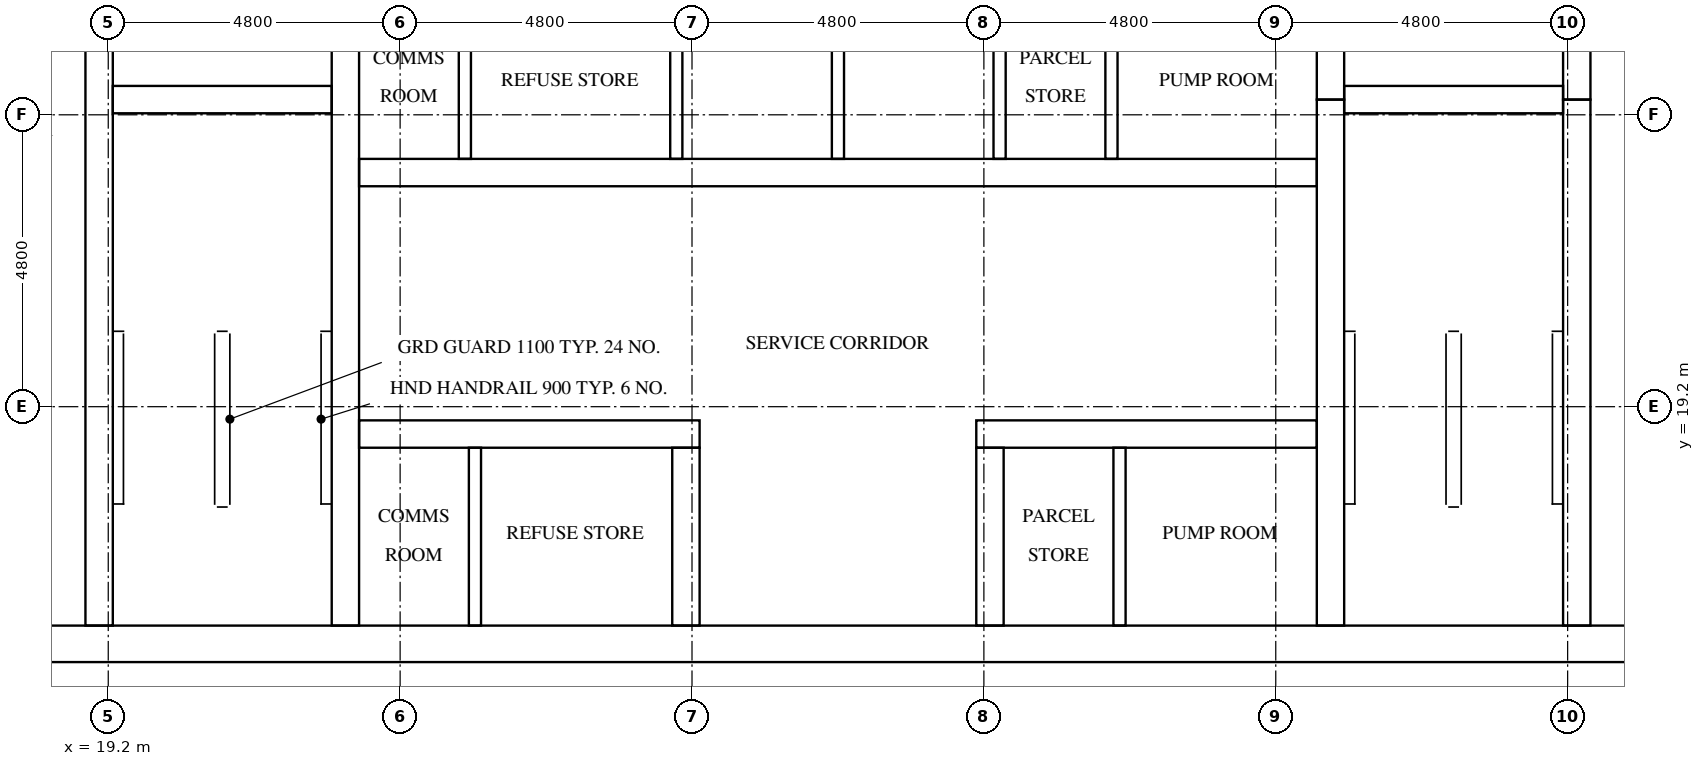
"""IFC4 building model, lengths in metres.
Left out: names, types, materials, properties, quantities, classifications, styles, units other than length and angle.
Written with IfcOpenShell. Run it as: python <this file> out.ifc"""

import sys

from ifc_helpers import new_model, si_unit, direction, frame, frame_2d, origin, place, context, subcontext, project, spatial, rectangle, extrude, element, fill, save


model = new_model("IFC4")
c1 = context("Model", 3, precision=1e-05, world=origin(), true_north=direction((0.0, 1.0)))
c2 = subcontext(c1, "Body", "Model", "MODEL_VIEW")
j1 = project(units=[si_unit("LENGTHUNIT", "METRE"), si_unit("PLANEANGLEUNIT", "RADIAN")], contexts=[c1])
p1 = place(None, origin())
s1 = spatial("IfcSite", under=j1, at=p1, CompositionType="ELEMENT")
p2 = place(p1, origin())
s2 = spatial("IfcBuilding", under=s1, at=p2, CompositionType="ELEMENT")
p3 = place(p2, frame((0.0, 0.0, 256.2)))
s3 = spatial("IfcBuildingStorey", under=s2, at=p3, CompositionType="ELEMENT", Elevation=256.2)
p4 = place(p3, frame((15.0, 15.3, 0.0), z_axis=(0.0, 0.0, 1.0), x_axis=(1.0, 0.0, 0.0)))
e1 = element("IfcWall", 1, at=p4, inside=s3, PredefinedType="SHEAR", context=c2, shape_type="SweptSolid", body=[
    extrude(rectangle(XDim=32.4, YDim=0.6, at=frame_2d((16.2, 0.0))), origin(), (0.0, 0.0, 1.0), 3.2),
])
p5 = place(p4, frame((15.3, 0.0, 0.0)))
e2 = element("IfcOpeningElement", 2, at=p5, cuts=e1, PredefinedType="OPENING", context=c2, shape_type="SweptSolid", body=[
    extrude(rectangle(XDim=1.8, YDim=2.1, at=frame_2d((0.9, 1.05))), frame((0.0, 0.31, 0.0), z_axis=(0.0, -1.0, 0.0), x_axis=(1.0, 0.0, 0.0)), (0.0, 0.0, 1.0), 0.62),
])
p6 = place(p3, frame((19.05, 15.6, 0.0), z_axis=(0.0, 0.0, 1.0), x_axis=(0.0, 1.0, 0.0)))
e3 = element("IfcWall", 3, at=p6, inside=s3, PredefinedType="SHEAR", context=c2, shape_type="SweptSolid", body=[
    extrude(rectangle(XDim=15.425, YDim=0.45, at=frame_2d((7.712, 0.0))), origin(), (0.0, 0.0, 1.0), 3.2),
])
p7 = place(p6, frame((9.85, 0.0, 0.0)))
e4 = element("IfcOpeningElement", 4, at=p7, cuts=e3, PredefinedType="OPENING", context=c2, shape_type="SweptSolid", body=[
    extrude(rectangle(XDim=1.1, YDim=2.1, at=frame_2d((0.55, 1.05))), frame((0.0, 0.235, 0.0), z_axis=(0.0, -1.0, 0.0), x_axis=(1.0, 0.0, 0.0)), (0.0, 0.0, 1.0), 0.47),
])
p8 = place(p6, frame((13.35, 0.0, 0.0)))
e5 = element("IfcOpeningElement", 5, at=p8, cuts=e3, PredefinedType="OPENING", context=c2, shape_type="SweptSolid", body=[
    extrude(rectangle(XDim=1.1, YDim=2.1, at=frame_2d((0.55, 1.05))), frame((0.0, 0.235, 0.0), z_axis=(0.0, -1.0, 0.0), x_axis=(1.0, 0.0, 0.0)), (0.0, 0.0, 1.0), 0.47),
])
p9 = place(p6, frame((0.6, 0.0, 0.0)))
e6 = element("IfcOpeningElement", 6, at=p9, cuts=e3, PredefinedType="OPENING", context=c2, shape_type="SweptSolid", body=[
    extrude(rectangle(XDim=1.2, YDim=2.1, at=frame_2d((0.6, 1.05))), frame((0.0, 0.235, 0.0), z_axis=(0.0, -1.0, 0.0), x_axis=(1.0, 0.0, 0.0)), (0.0, 0.0, 1.0), 0.47),
])
p10 = place(p3, frame((23.1, 15.6, 0.0), z_axis=(0.0, 0.0, 1.0), x_axis=(0.0, 1.0, 0.0)))
e7 = element("IfcWall", 7, at=p10, inside=s3, PredefinedType="SHEAR", context=c2, shape_type="SweptSolid", body=[
    extrude(rectangle(XDim=21.6, YDim=0.45, at=frame_2d((10.8, 0.0))), origin(), (0.0, 0.0, 1.0), 3.2),
])
p11 = place(p3, frame((39.3, 15.6, 0.0), z_axis=(0.0, 0.0, 1.0), x_axis=(0.0, 1.0, 0.0)))
e8 = element("IfcWall", 8, at=p11, inside=s3, PredefinedType="SHEAR", context=c2, shape_type="SweptSolid", body=[
    extrude(rectangle(XDim=8.65, YDim=0.45, at=frame_2d((4.325, 0.0))), origin(), (0.0, 0.0, 1.0), 3.2),
])
p12 = place(p3, frame((39.3, 24.25, 0.0), z_axis=(0.0, 0.0, 1.0), x_axis=(0.0, 1.0, 0.0)))
e9 = element("IfcWall", 9, at=p12, inside=s3, PredefinedType="SHEAR", context=c2, shape_type="SweptSolid", body=[
    extrude(rectangle(XDim=3.5, YDim=0.45, at=frame_2d((1.75, 0.0))), origin(), (0.0, 0.0, 1.0), 3.2),
])
p13 = place(p3, frame((43.35, 15.6, 0.0), z_axis=(0.0, 0.0, 1.0), x_axis=(0.0, 1.0, 0.0)))
e10 = element("IfcWall", 10, at=p13, inside=s3, PredefinedType="SHEAR", context=c2, shape_type="SweptSolid", body=[
    extrude(rectangle(XDim=8.65, YDim=0.45, at=frame_2d((4.325, 0.0))), origin(), (0.0, 0.0, 1.0), 3.2),
])
p14 = place(p13, frame((0.6, 0.0, 0.0)))
e11 = element("IfcOpeningElement", 11, at=p14, cuts=e10, PredefinedType="OPENING", context=c2, shape_type="SweptSolid", body=[
    extrude(rectangle(XDim=1.2, YDim=2.1, at=frame_2d((0.6, 1.05))), frame((0.0, 0.235, 0.0), z_axis=(0.0, -1.0, 0.0), x_axis=(1.0, 0.0, 0.0)), (0.0, 0.0, 1.0), 0.47),
])
p15 = place(p3, frame((43.35, 24.25, 0.0), z_axis=(0.0, 0.0, 1.0), x_axis=(0.0, 1.0, 0.0)))
e12 = element("IfcWall", 12, at=p15, inside=s3, PredefinedType="SHEAR", context=c2, shape_type="SweptSolid", body=[
    extrude(rectangle(XDim=3.5, YDim=0.45, at=frame_2d((1.75, 0.0))), origin(), (0.0, 0.0, 1.0), 3.2),
])
p16 = place(p15, frame((1.2, 0.0, 0.0)))
e13 = element("IfcOpeningElement", 13, at=p16, cuts=e12, PredefinedType="OPENING", context=c2, shape_type="SweptSolid", body=[
    extrude(rectangle(XDim=1.1, YDim=2.1, at=frame_2d((0.55, 1.05))), frame((0.0, 0.235, 0.0), z_axis=(0.0, -1.0, 0.0), x_axis=(1.0, 0.0, 0.0)), (0.0, 0.0, 1.0), 0.47),
])
for number, where, z_axis, x_axis in (
    (14, (19.275, 24.25, 0.0), (0.0, 0.0, 1.0), (1.0, 0.0, 0.0)),
    (15, (39.525, 24.25, 0.0), (0.0, 0.0, 1.0), (1.0, 0.0, 0.0)),
):
    element("IfcWall", number, at=place(p3, frame(where, z_axis=z_axis, x_axis=x_axis)), inside=s3, PredefinedType="SHEAR", context=c2, shape_type="SweptSolid", body=[
        extrude(rectangle(XDim=3.6, YDim=0.45, at=frame_2d((1.8, 0.0))), origin(), (0.0, 0.0, 1.0), 3.2),
    ])
p17 = place(p3, frame((23.325, 18.75, 0.0), z_axis=(0.0, 0.0, 1.0), x_axis=(1.0, 0.0, 0.0)))
e16 = element("IfcWall", 16, at=p17, inside=s3, PredefinedType="SHEAR", context=c2, shape_type="SweptSolid", body=[
    extrude(rectangle(XDim=5.6, YDim=0.45, at=frame_2d((2.8, 0.0))), origin(), (0.0, 0.0, 1.0), 3.2),
])
p18 = place(p17, frame((0.403, 0.0, 0.0)))
e17 = element("IfcOpeningElement", 17, at=p18, cuts=e16, PredefinedType="OPENING", context=c2, shape_type="SweptSolid", body=[
    extrude(rectangle(XDim=1.0, YDim=2.1, at=frame_2d((0.5, 1.05))), frame((0.0, 0.235, 0.0), z_axis=(0.0, -1.0, 0.0), x_axis=(1.0, 0.0, 0.0)), (0.0, 0.0, 1.0), 0.47),
])
p19 = place(p17, frame((3.078, 0.0, 0.0)))
e18 = element("IfcOpeningElement", 18, at=p19, cuts=e16, PredefinedType="OPENING", context=c2, shape_type="SweptSolid", body=[
    extrude(rectangle(XDim=1.0, YDim=2.1, at=frame_2d((0.5, 1.05))), frame((0.0, 0.235, 0.0), z_axis=(0.0, -1.0, 0.0), x_axis=(1.0, 0.0, 0.0)), (0.0, 0.0, 1.0), 0.47),
])
p20 = place(p3, frame((33.475, 18.75, 0.0), z_axis=(0.0, 0.0, 1.0), x_axis=(1.0, 0.0, 0.0)))
e19 = element("IfcWall", 19, at=p20, inside=s3, PredefinedType="SHEAR", context=c2, shape_type="SweptSolid", body=[
    extrude(rectangle(XDim=5.6, YDim=0.45, at=frame_2d((2.8, 0.0))), origin(), (0.0, 0.0, 1.0), 3.2),
])
p21 = place(p20, frame((0.853, 0.0, 0.0)))
e20 = element("IfcOpeningElement", 20, at=p21, cuts=e19, PredefinedType="OPENING", context=c2, shape_type="SweptSolid", body=[
    extrude(rectangle(XDim=1.0, YDim=2.1, at=frame_2d((0.5, 1.05))), frame((0.0, 0.235, 0.0), z_axis=(0.0, -1.0, 0.0), x_axis=(1.0, 0.0, 0.0)), (0.0, 0.0, 1.0), 0.47),
])
p22 = place(p20, frame((3.528, 0.0, 0.0)))
e21 = element("IfcOpeningElement", 21, at=p22, cuts=e19, PredefinedType="OPENING", context=c2, shape_type="SweptSolid", body=[
    extrude(rectangle(XDim=1.0, YDim=2.1, at=frame_2d((0.5, 1.05))), frame((0.0, 0.235, 0.0), z_axis=(0.0, -1.0, 0.0), x_axis=(1.0, 0.0, 0.0)), (0.0, 0.0, 1.0), 0.47),
])
p23 = place(p3, frame((23.325, 23.05, 0.0), z_axis=(0.0, 0.0, 1.0), x_axis=(1.0, 0.0, 0.0)))
e22 = element("IfcWall", 22, at=p23, inside=s3, PredefinedType="SHEAR", context=c2, shape_type="SweptSolid", body=[
    extrude(rectangle(XDim=15.75, YDim=0.45, at=frame_2d((7.875, 0.0))), origin(), (0.0, 0.0, 1.0), 3.2),
])
p24 = place(p23, frame((0.32, 0.0, 0.0)))
e23 = element("IfcOpeningElement", 23, at=p24, cuts=e22, PredefinedType="OPENING", context=c2, shape_type="SweptSolid", body=[
    extrude(rectangle(XDim=1.0, YDim=2.1, at=frame_2d((0.5, 1.05))), frame((0.0, 0.235, 0.0), z_axis=(0.0, -1.0, 0.0), x_axis=(1.0, 0.0, 0.0)), (0.0, 0.0, 1.0), 0.47),
])
p25 = place(p23, frame((2.978, 0.0, 0.0)))
e24 = element("IfcOpeningElement", 24, at=p25, cuts=e22, PredefinedType="OPENING", context=c2, shape_type="SweptSolid", body=[
    extrude(rectangle(XDim=1.0, YDim=2.1, at=frame_2d((0.5, 1.05))), frame((0.0, 0.235, 0.0), z_axis=(0.0, -1.0, 0.0), x_axis=(1.0, 0.0, 0.0)), (0.0, 0.0, 1.0), 0.47),
])
p26 = place(p23, frame((10.953, 0.0, 0.0)))
e25 = element("IfcOpeningElement", 25, at=p26, cuts=e22, PredefinedType="OPENING", context=c2, shape_type="SweptSolid", body=[
    extrude(rectangle(XDim=1.0, YDim=2.1, at=frame_2d((0.5, 1.05))), frame((0.0, 0.235, 0.0), z_axis=(0.0, -1.0, 0.0), x_axis=(1.0, 0.0, 0.0)), (0.0, 0.0, 1.0), 0.47),
])
p27 = place(p23, frame((13.612, 0.0, 0.0)))
e26 = element("IfcOpeningElement", 26, at=p27, cuts=e22, PredefinedType="OPENING", context=c2, shape_type="SweptSolid", body=[
    extrude(rectangle(XDim=1.0, YDim=2.1, at=frame_2d((0.5, 1.05))), frame((0.0, 0.235, 0.0), z_axis=(0.0, -1.0, 0.0), x_axis=(1.0, 0.0, 0.0)), (0.0, 0.0, 1.0), 0.47),
])
for number, where, z_axis, x_axis in (
    (27, (28.7, 15.6, 0.0), (0.0, 0.0, 1.0), (0.0, 1.0, 0.0)),
    (28, (33.7, 15.6, 0.0), (0.0, 0.0, 1.0), (0.0, 1.0, 0.0)),
):
    element("IfcWall", number, at=place(p3, frame(where, z_axis=z_axis, x_axis=x_axis)), inside=s3, PredefinedType="SHEAR", context=c2, shape_type="SweptSolid", body=[
        extrude(rectangle(XDim=2.925, YDim=0.45, at=frame_2d((1.462, 0.0))), origin(), (0.0, 0.0, 1.0), 3.2),
    ])
for number, where, z_axis, x_axis in (
    (29, (28.542, 23.275, 0.0), (0.0, 0.0, 1.0), (0.0, 1.0, 0.0)),
    (30, (31.2, 23.275, 0.0), (0.0, 0.0, 1.0), (0.0, 1.0, 0.0)),
    (31, (33.858, 23.275, 0.0), (0.0, 0.0, 1.0), (0.0, 1.0, 0.0)),
):
    element("IfcWall", number, at=place(p3, frame(where, z_axis=z_axis, x_axis=x_axis)), inside=s3, PredefinedType="SOLIDWALL", context=c2, shape_type="SweptSolid", body=[
        extrude(rectangle(XDim=2.65, YDim=0.2, at=frame_2d((1.325, 0.0))), origin(), (0.0, 0.0, 1.0), 3.2),
    ])
for number, where, z_axis, x_axis in (
    (32, (25.065, 23.275, 0.0), (0.0, 0.0, 1.0), (0.0, 1.0, 0.0)),
    (33, (35.698, 23.275, 0.0), (0.0, 0.0, 1.0), (0.0, 1.0, 0.0)),
):
    element("IfcWall", number, at=place(p3, frame(where, z_axis=z_axis, x_axis=x_axis)), inside=s3, PredefinedType="PARTITIONING", context=c2, shape_type="SweptSolid", body=[
        extrude(rectangle(XDim=2.65, YDim=0.2, at=frame_2d((1.325, 0.0))), origin(), (0.0, 0.0, 1.0), 3.2),
    ])
for number, where, z_axis, x_axis in (
    (34, (25.23, 15.6, 0.0), (0.0, 0.0, 1.0), (0.0, 1.0, 0.0)),
    (35, (35.831, 15.6, 0.0), (0.0, 0.0, 1.0), (0.0, 1.0, 0.0)),
):
    element("IfcWall", number, at=place(p3, frame(where, z_axis=z_axis, x_axis=x_axis)), inside=s3, PredefinedType="PARTITIONING", context=c2, shape_type="SweptSolid", body=[
        extrude(rectangle(XDim=2.925, YDim=0.2, at=frame_2d((1.462, 0.0))), origin(), (0.0, 0.0, 1.0), 3.2),
    ])
p28 = place(p9, frame((1.2, 0.0, 0.0), z_axis=(0.0, 0.0, 1.0), x_axis=(-1.0, 0.0, 0.0)))
e36 = element("IfcDoor", 36, at=p28, inside=s3, OperationType="SINGLE_SWING_LEFT", PredefinedType="DOOR", context=c2, shape_type="SweptSolid", body=[
    extrude(rectangle(XDim=1.2, YDim=2.1, at=frame_2d((0.6, 1.05))), frame((0.0, 0.025, 0.0), z_axis=(0.0, -1.0, 0.0), x_axis=(1.0, 0.0, 0.0)), (0.0, 0.0, 1.0), 0.05),
])
fill(e6, e36)
p29 = place(p14, origin())
e37 = element("IfcDoor", 37, at=p29, inside=s3, OperationType="SINGLE_SWING_RIGHT", PredefinedType="DOOR", context=c2, shape_type="SweptSolid", body=[
    extrude(rectangle(XDim=1.2, YDim=2.1, at=frame_2d((0.6, 1.05))), frame((0.0, 0.025, 0.0), z_axis=(0.0, -1.0, 0.0), x_axis=(1.0, 0.0, 0.0)), (0.0, 0.0, 1.0), 0.05),
])
fill(e11, e37)
p30 = place(p5, frame((1.8, 0.0, 0.0), z_axis=(0.0, 0.0, 1.0), x_axis=(-1.0, 0.0, 0.0)))
e38 = element("IfcDoor", 38, at=p30, inside=s3, OperationType="DOUBLE_DOOR_SINGLE_SWING", PredefinedType="DOOR", context=c2, shape_type="SweptSolid", body=[
    extrude(rectangle(XDim=1.8, YDim=2.1, at=frame_2d((0.9, 1.05))), frame((0.0, 0.025, 0.0), z_axis=(0.0, -1.0, 0.0), x_axis=(1.0, 0.0, 0.0)), (0.0, 0.0, 1.0), 0.05),
])
fill(e2, e38)
p31 = place(p24, frame((1.0, 0.0, 0.0), z_axis=(0.0, 0.0, 1.0), x_axis=(-1.0, 0.0, 0.0)))
e39 = element("IfcDoor", 39, at=p31, inside=s3, OperationType="SINGLE_SWING_RIGHT", PredefinedType="DOOR", context=c2, shape_type="SweptSolid", body=[
    extrude(rectangle(XDim=1.0, YDim=2.1, at=frame_2d((0.5, 1.05))), frame((0.0, 0.025, 0.0), z_axis=(0.0, -1.0, 0.0), x_axis=(1.0, 0.0, 0.0)), (0.0, 0.0, 1.0), 0.05),
])
fill(e23, e39)
p32 = place(p25, frame((1.0, 0.0, 0.0), z_axis=(0.0, 0.0, 1.0), x_axis=(-1.0, 0.0, 0.0)))
e40 = element("IfcDoor", 40, at=p32, inside=s3, OperationType="SINGLE_SWING_LEFT", PredefinedType="DOOR", context=c2, shape_type="SweptSolid", body=[
    extrude(rectangle(XDim=1.0, YDim=2.1, at=frame_2d((0.5, 1.05))), frame((0.0, 0.025, 0.0), z_axis=(0.0, -1.0, 0.0), x_axis=(1.0, 0.0, 0.0)), (0.0, 0.0, 1.0), 0.05),
])
fill(e24, e40)
p33 = place(p26, frame((1.0, 0.0, 0.0), z_axis=(0.0, 0.0, 1.0), x_axis=(-1.0, 0.0, 0.0)))
e41 = element("IfcDoor", 41, at=p33, inside=s3, OperationType="SINGLE_SWING_RIGHT", PredefinedType="DOOR", context=c2, shape_type="SweptSolid", body=[
    extrude(rectangle(XDim=1.0, YDim=2.1, at=frame_2d((0.5, 1.05))), frame((0.0, 0.025, 0.0), z_axis=(0.0, -1.0, 0.0), x_axis=(1.0, 0.0, 0.0)), (0.0, 0.0, 1.0), 0.05),
])
fill(e25, e41)
p34 = place(p27, frame((1.0, 0.0, 0.0), z_axis=(0.0, 0.0, 1.0), x_axis=(-1.0, 0.0, 0.0)))
e42 = element("IfcDoor", 42, at=p34, inside=s3, OperationType="SINGLE_SWING_LEFT", PredefinedType="DOOR", context=c2, shape_type="SweptSolid", body=[
    extrude(rectangle(XDim=1.0, YDim=2.1, at=frame_2d((0.5, 1.05))), frame((0.0, 0.025, 0.0), z_axis=(0.0, -1.0, 0.0), x_axis=(1.0, 0.0, 0.0)), (0.0, 0.0, 1.0), 0.05),
])
fill(e26, e42)
p35 = place(p18, origin())
e43 = element("IfcDoor", 43, at=p35, inside=s3, OperationType="SINGLE_SWING_RIGHT", PredefinedType="DOOR", context=c2, shape_type="SweptSolid", body=[
    extrude(rectangle(XDim=1.0, YDim=2.1, at=frame_2d((0.5, 1.05))), frame((0.0, 0.025, 0.0), z_axis=(0.0, -1.0, 0.0), x_axis=(1.0, 0.0, 0.0)), (0.0, 0.0, 1.0), 0.05),
])
fill(e17, e43)
p36 = place(p19, origin())
e44 = element("IfcDoor", 44, at=p36, inside=s3, OperationType="SINGLE_SWING_LEFT", PredefinedType="DOOR", context=c2, shape_type="SweptSolid", body=[
    extrude(rectangle(XDim=1.0, YDim=2.1, at=frame_2d((0.5, 1.05))), frame((0.0, 0.025, 0.0), z_axis=(0.0, -1.0, 0.0), x_axis=(1.0, 0.0, 0.0)), (0.0, 0.0, 1.0), 0.05),
])
fill(e18, e44)
p37 = place(p21, origin())
e45 = element("IfcDoor", 45, at=p37, inside=s3, OperationType="SINGLE_SWING_RIGHT", PredefinedType="DOOR", context=c2, shape_type="SweptSolid", body=[
    extrude(rectangle(XDim=1.0, YDim=2.1, at=frame_2d((0.5, 1.05))), frame((0.0, 0.025, 0.0), z_axis=(0.0, -1.0, 0.0), x_axis=(1.0, 0.0, 0.0)), (0.0, 0.0, 1.0), 0.05),
])
fill(e20, e45)
p38 = place(p22, origin())
e46 = element("IfcDoor", 46, at=p38, inside=s3, OperationType="SINGLE_SWING_LEFT", PredefinedType="DOOR", context=c2, shape_type="SweptSolid", body=[
    extrude(rectangle(XDim=1.0, YDim=2.1, at=frame_2d((0.5, 1.05))), frame((0.0, 0.025, 0.0), z_axis=(0.0, -1.0, 0.0), x_axis=(1.0, 0.0, 0.0)), (0.0, 0.0, 1.0), 0.05),
])
fill(e21, e46)
save(model, sys.argv[1])
